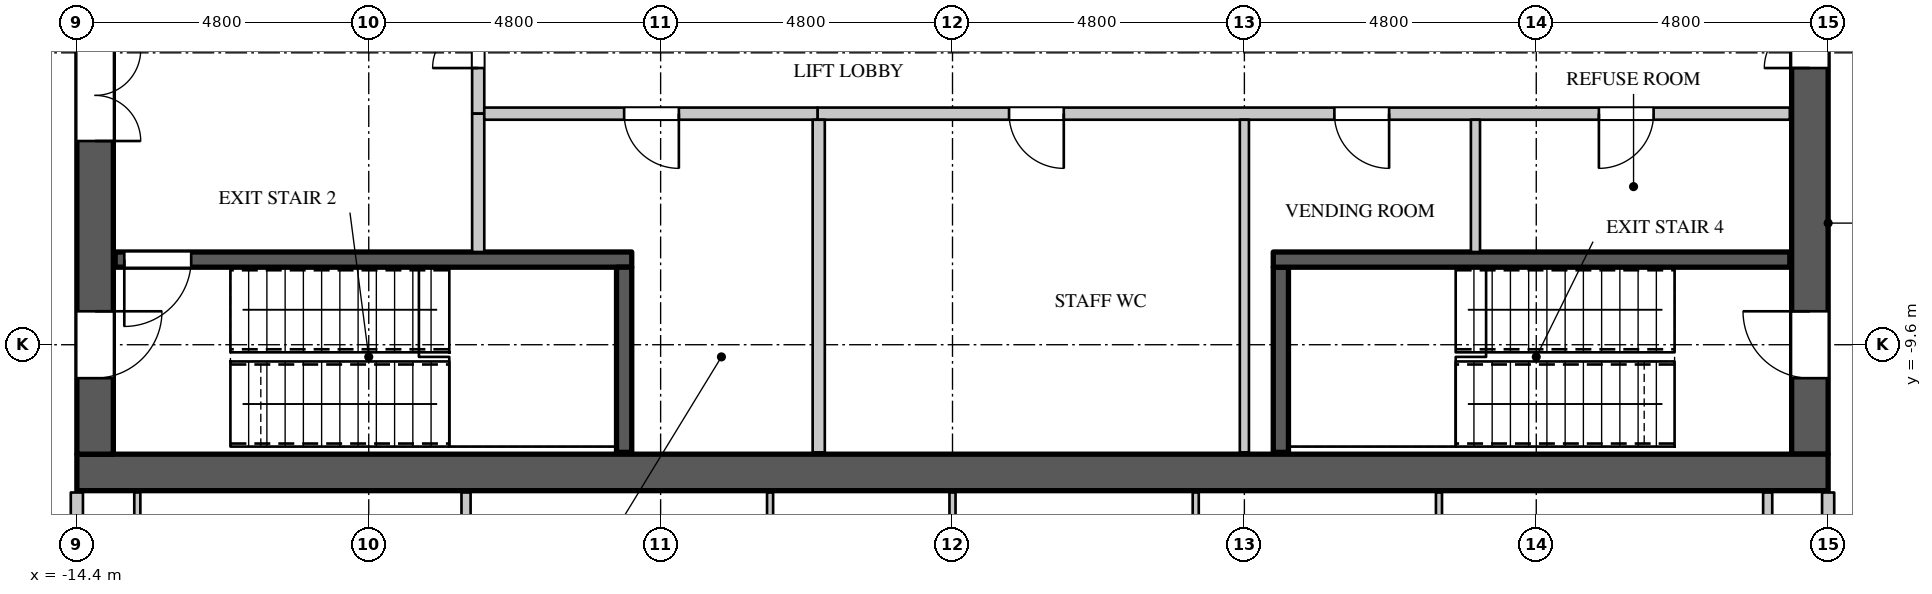
"""IFC4 building model, lengths in metres.
Left out: names, types, materials, properties, quantities, classifications, styles, units other than length and angle.
Written with IfcOpenShell. Run it as: python <this file> out.ifc"""

import sys

from ifc_helpers import new_model, si_unit, direction, frame, frame_2d, origin, place, context, subcontext, project, spatial, rectangle, extrude, element, fill, save


model = new_model("IFC4")
c1 = context("Model", 3, precision=1e-05, world=origin(), true_north=direction((0.0, 1.0)))
c2 = subcontext(c1, "Body", "Model", "MODEL_VIEW")
j1 = project(units=[si_unit("LENGTHUNIT", "METRE"), si_unit("PLANEANGLEUNIT", "RADIAN")], contexts=[c1])
p1 = place(None, origin())
s1 = spatial("IfcSite", under=j1, at=p1, CompositionType="ELEMENT")
p2 = place(p1, origin())
s2 = spatial("IfcBuilding", under=s1, at=p2, CompositionType="ELEMENT")
p3 = place(p2, frame((0.0, 0.0, 293.7)))
s3 = spatial("IfcBuildingStorey", under=s2, at=p3, CompositionType="ELEMENT", Elevation=293.7)
p4 = place(p3, frame((-14.4, -11.7, 0.0), z_axis=(0.0, 0.0, 1.0), x_axis=(1.0, 0.0, 0.0)))
e1 = element("IfcWall", 1, at=p4, inside=s3, PredefinedType="SHEAR", context=c2, shape_type="SweptSolid", body=[
    extrude(rectangle(XDim=28.8, YDim=0.6, at=frame_2d((14.4, 0.0))), origin(), (0.0, 0.0, 1.0), 4.2),
])
p5 = place(p3, frame((14.1, -11.4, 0.0), z_axis=(0.0, 0.0, 1.0), x_axis=(0.0, 1.0, 0.0)))
e2 = element("IfcWall", 2, at=p5, inside=s3, PredefinedType="SHEAR", context=c2, shape_type="SweptSolid", body=[
    extrude(rectangle(XDim=22.8, YDim=0.6, at=frame_2d((11.4, 0.0))), origin(), (0.0, 0.0, 1.0), 4.2),
])
p6 = place(p5, frame((20.45, 0.0, 0.0)))
e3 = element("IfcOpeningElement", 3, at=p6, cuts=e2, PredefinedType="OPENING", context=c2, shape_type="SweptSolid", body=[
    extrude(rectangle(XDim=1.1, YDim=2.2, at=frame_2d((0.55, 1.1))), frame((0.0, 0.31, 0.0), z_axis=(0.0, -1.0, 0.0), x_axis=(1.0, 0.0, 0.0)), (0.0, 0.0, 1.0), 0.62),
])
p7 = place(p5, frame((1.25, 0.0, 0.0)))
e4 = element("IfcOpeningElement", 4, at=p7, cuts=e2, PredefinedType="OPENING", context=c2, shape_type="SweptSolid", body=[
    extrude(rectangle(XDim=1.1, YDim=2.2, at=frame_2d((0.55, 1.1))), frame((0.0, 0.31, 0.0), z_axis=(0.0, -1.0, 0.0), x_axis=(1.0, 0.0, 0.0)), (0.0, 0.0, 1.0), 0.62),
])
p8 = place(p5, frame((14.95, 0.0, 0.0)))
e5 = element("IfcOpeningElement", 5, at=p8, cuts=e2, PredefinedType="OPENING", context=c2, shape_type="SweptSolid", body=[
    extrude(rectangle(XDim=1.5, YDim=2.4, at=frame_2d((0.75, 1.2))), frame((0.0, 0.31, 0.0), z_axis=(0.0, -1.0, 0.0), x_axis=(1.0, 0.0, 0.0)), (0.0, 0.0, 1.0), 0.62),
])
p9 = place(p5, frame((6.35, 0.0, 0.0)))
e6 = element("IfcOpeningElement", 6, at=p9, cuts=e2, PredefinedType="OPENING", context=c2, shape_type="SweptSolid", body=[
    extrude(rectangle(XDim=1.5, YDim=2.4, at=frame_2d((0.75, 1.2))), frame((0.0, 0.31, 0.0), z_axis=(0.0, -1.0, 0.0), x_axis=(1.0, 0.0, 0.0)), (0.0, 0.0, 1.0), 0.62),
])
p10 = place(p3, frame((-14.1, -11.4, 0.0), z_axis=(0.0, 0.0, 1.0), x_axis=(0.0, 1.0, 0.0)))
e7 = element("IfcWall", 7, at=p10, inside=s3, PredefinedType="SHEAR", context=c2, shape_type="SweptSolid", body=[
    extrude(rectangle(XDim=22.8, YDim=0.6, at=frame_2d((11.4, 0.0))), origin(), (0.0, 0.0, 1.0), 4.2),
])
p11 = place(p10, frame((20.45, 0.0, 0.0)))
e8 = element("IfcOpeningElement", 8, at=p11, cuts=e7, PredefinedType="OPENING", context=c2, shape_type="SweptSolid", body=[
    extrude(rectangle(XDim=1.1, YDim=2.2, at=frame_2d((0.55, 1.1))), frame((0.0, 0.31, 0.0), z_axis=(0.0, -1.0, 0.0), x_axis=(1.0, 0.0, 0.0)), (0.0, 0.0, 1.0), 0.62),
])
p12 = place(p10, frame((1.25, 0.0, 0.0)))
e9 = element("IfcOpeningElement", 9, at=p12, cuts=e7, PredefinedType="OPENING", context=c2, shape_type="SweptSolid", body=[
    extrude(rectangle(XDim=1.1, YDim=2.2, at=frame_2d((0.55, 1.1))), frame((0.0, 0.31, 0.0), z_axis=(0.0, -1.0, 0.0), x_axis=(1.0, 0.0, 0.0)), (0.0, 0.0, 1.0), 0.62),
])
p13 = place(p10, frame((16.15, 0.0, 0.0)))
e10 = element("IfcOpeningElement", 10, at=p13, cuts=e7, PredefinedType="OPENING", context=c2, shape_type="SweptSolid", body=[
    extrude(rectangle(XDim=1.5, YDim=2.4, at=frame_2d((0.75, 1.2))), frame((0.0, 0.31, 0.0), z_axis=(0.0, -1.0, 0.0), x_axis=(1.0, 0.0, 0.0)), (0.0, 0.0, 1.0), 0.62),
])
p14 = place(p10, frame((5.15, 0.0, 0.0)))
e11 = element("IfcOpeningElement", 11, at=p14, cuts=e7, PredefinedType="OPENING", context=c2, shape_type="SweptSolid", body=[
    extrude(rectangle(XDim=1.5, YDim=2.4, at=frame_2d((0.75, 1.2))), frame((0.0, 0.31, 0.0), z_axis=(0.0, -1.0, 0.0), x_axis=(1.0, 0.0, 0.0)), (0.0, 0.0, 1.0), 0.62),
])
p15 = place(p3, frame((-14.4, -14.3, 0.0), z_axis=(0.0, 0.0, 1.0), x_axis=(0.0, 1.0, 0.0)))
e12 = element("IfcWall", 12, at=p15, inside=s3, PredefinedType="PARTITIONING", context=c2, shape_type="SweptSolid", body=[
    extrude(rectangle(XDim=2.27, YDim=0.2, at=frame_2d((1.135, 0.0))), origin(), (0.0, 0.0, 1.0), 3.95),
])
p16 = place(p3, frame((-7.8, -5.8, 0.0), z_axis=(0.0, 0.0, 1.0), x_axis=(0.0, 1.0, 0.0)))
e13 = element("IfcWall", 13, at=p16, inside=s3, PredefinedType="PARTITIONING", context=c2, shape_type="SweptSolid", body=[
    extrude(rectangle(XDim=3.0, YDim=0.2, at=frame_2d((1.5, 0.0))), origin(), (0.0, 0.0, 1.0), 3.95),
])
p17 = place(p16, frame((0.75, 0.0, 0.0)))
e14 = element("IfcOpeningElement", 14, at=p17, cuts=e13, PredefinedType="OPENING", context=c2, shape_type="SweptSolid", body=[
    extrude(rectangle(XDim=1.5, YDim=2.4, at=frame_2d((0.75, 1.2))), frame((0.0, 0.11, 0.0), z_axis=(0.0, -1.0, 0.0), x_axis=(1.0, 0.0, 0.0)), (0.0, 0.0, 1.0), 0.22),
])
p18 = place(p3, frame((-2.22, -5.8, 0.0), z_axis=(0.0, 0.0, 1.0), x_axis=(1.0, 0.0, 0.0)))
e15 = element("IfcWall", 15, at=p18, inside=s3, PredefinedType="PARTITIONING", context=c2, shape_type="SweptSolid", body=[
    extrude(rectangle(XDim=15.99, YDim=0.2, at=frame_2d((7.995, 0.0))), origin(), (0.0, 0.0, 1.0), 3.95),
])
p19 = place(p18, frame((3.15, 0.0, 0.0)))
e16 = element("IfcOpeningElement", 16, at=p19, cuts=e15, PredefinedType="OPENING", context=c2, shape_type="SweptSolid", body=[
    extrude(rectangle(XDim=0.9, YDim=2.2, at=frame_2d((0.45, 1.1))), frame((0.0, 0.11, 0.0), z_axis=(0.0, -1.0, 0.0), x_axis=(1.0, 0.0, 0.0)), (0.0, 0.0, 1.0), 0.22),
])
p20 = place(p18, frame((8.5, 0.0, 0.0)))
e17 = element("IfcOpeningElement", 17, at=p20, cuts=e15, PredefinedType="OPENING", context=c2, shape_type="SweptSolid", body=[
    extrude(rectangle(XDim=0.9, YDim=2.2, at=frame_2d((0.45, 1.1))), frame((0.0, 0.11, 0.0), z_axis=(0.0, -1.0, 0.0), x_axis=(1.0, 0.0, 0.0)), (0.0, 0.0, 1.0), 0.22),
])
p21 = place(p18, frame((12.85, 0.0, 0.0)))
e18 = element("IfcOpeningElement", 18, at=p21, cuts=e15, PredefinedType="OPENING", context=c2, shape_type="SweptSolid", body=[
    extrude(rectangle(XDim=0.9, YDim=2.2, at=frame_2d((0.45, 1.1))), frame((0.0, 0.11, 0.0), z_axis=(0.0, -1.0, 0.0), x_axis=(1.0, 0.0, 0.0)), (0.0, 0.0, 1.0), 0.22),
])
p22 = place(p3, frame((14.4, -14.3, 0.0), z_axis=(0.0, 0.0, 1.0), x_axis=(0.0, 1.0, 0.0)))
e19 = element("IfcWall", 19, at=p22, inside=s3, PredefinedType="PARTITIONING", context=c2, shape_type="SweptSolid", body=[
    extrude(rectangle(XDim=2.27, YDim=0.2, at=frame_2d((1.135, 0.0))), origin(), (0.0, 0.0, 1.0), 3.95),
])
p23 = place(p3, frame((-8.0, -17.425, 0.0), z_axis=(0.0, 0.0, 1.0), x_axis=(0.0, 1.0, 0.0)))
e20 = element("IfcWall", 20, at=p23, inside=s3, PredefinedType="PARTITIONING", context=c2, shape_type="SweptSolid", body=[
    extrude(rectangle(XDim=5.395, YDim=0.15, at=frame_2d((2.698, 0.0))), origin(), (0.0, 0.0, 1.0), 3.95),
])
p24 = place(p23, frame((2.25, 0.0, 0.0)))
e21 = element("IfcOpeningElement", 21, at=p24, cuts=e20, PredefinedType="OPENING", context=c2, shape_type="SweptSolid", body=[
    extrude(rectangle(XDim=0.9, YDim=2.2, at=frame_2d((0.45, 1.1))), frame((0.0, 0.085, 0.0), z_axis=(0.0, -1.0, 0.0), x_axis=(1.0, 0.0, 0.0)), (0.0, 0.0, 1.0), 0.17),
])
p25 = place(p3, frame((4.8, -11.37, 0.0), z_axis=(0.0, 0.0, 1.0), x_axis=(0.0, 1.0, 0.0)))
e22 = element("IfcWall", 22, at=p25, inside=s3, PredefinedType="PARTITIONING", context=c2, shape_type="SweptSolid", body=[
    extrude(rectangle(XDim=5.47, YDim=0.15, at=frame_2d((2.735, 0.0))), origin(), (0.0, 0.0, 1.0), 3.95),
])
p26 = place(p3, frame((8.6, -8.075, 0.0), z_axis=(0.0, 0.0, 1.0), x_axis=(0.0, 1.0, 0.0)))
e23 = element("IfcWall", 23, at=p26, inside=s3, PredefinedType="PARTITIONING", context=c2, shape_type="SweptSolid", body=[
    extrude(rectangle(XDim=2.175, YDim=0.15, at=frame_2d((1.087, 0.0))), origin(), (0.0, 0.0, 1.0), 3.95),
])
p27 = place(p3, frame((13.406, -25.731, 0.0), z_axis=(0.0, 0.0, 1.0), x_axis=(0.0, 1.0, 0.0)))
e24 = element("IfcWall", 24, at=p27, inside=s3, PredefinedType="PARTITIONING", context=c2, shape_type="SweptSolid", body=[
    extrude(rectangle(XDim=13.701, YDim=0.15, at=frame_2d((6.851, 0.0))), origin(), (0.0, 0.0, 1.0), 3.3),
])
p28 = place(p27, frame((9.7, 0.0, 0.0)))
e25 = element("IfcOpeningElement", 25, at=p28, cuts=e24, PredefinedType="OPENING", context=c2, shape_type="SweptSolid", body=[
    extrude(rectangle(XDim=1.5, YDim=2.2, at=frame_2d((0.75, 1.1))), frame((0.0, 0.085, 0.0), z_axis=(0.0, -1.0, 0.0), x_axis=(1.0, 0.0, 0.0)), (0.0, 0.0, 1.0), 0.17),
])
p29 = place(p3, frame((-7.8, -8.075, 0.0), z_axis=(0.0, 0.0, 1.0), x_axis=(0.0, 1.0, 0.0)))
e26 = element("IfcWall", 26, at=p29, inside=s3, PredefinedType="PARTITIONING", context=c2, shape_type="SweptSolid", body=[
    extrude(rectangle(XDim=2.275, YDim=0.2, at=frame_2d((1.137, 0.0))), origin(), (0.0, 0.0, 1.0), 3.95),
])
p30 = place(p3, frame((-7.7, -5.8, 0.0), z_axis=(0.0, 0.0, 1.0), x_axis=(1.0, 0.0, 0.0)))
e27 = element("IfcWall", 27, at=p30, inside=s3, PredefinedType="PARTITIONING", context=c2, shape_type="SweptSolid", body=[
    extrude(rectangle(XDim=5.48, YDim=0.2, at=frame_2d((2.74, 0.0))), origin(), (0.0, 0.0, 1.0), 3.95),
])
p31 = place(p30, frame((2.3, 0.0, 0.0)))
e28 = element("IfcOpeningElement", 28, at=p31, cuts=e27, PredefinedType="OPENING", context=c2, shape_type="SweptSolid", body=[
    extrude(rectangle(XDim=0.9, YDim=2.2, at=frame_2d((0.45, 1.1))), frame((0.0, 0.11, 0.0), z_axis=(0.0, -1.0, 0.0), x_axis=(1.0, 0.0, 0.0)), (0.0, 0.0, 1.0), 0.22),
])
p32 = place(p3, frame((-2.2, -11.37, 0.0), z_axis=(0.0, 0.0, 1.0), x_axis=(0.0, 1.0, 0.0)))
e29 = element("IfcWall", 29, at=p32, inside=s3, PredefinedType="PARTITIONING", context=c2, shape_type="SweptSolid", body=[
    extrude(rectangle(XDim=5.47, YDim=0.2, at=frame_2d((2.735, 0.0))), origin(), (0.0, 0.0, 1.0), 3.95),
])
p33 = place(p3, frame((-13.77, -8.2, 0.0), z_axis=(0.0, 0.0, 1.0), x_axis=(1.0, 0.0, 0.0)))
e30 = element("IfcWall", 30, at=p33, inside=s3, PredefinedType="SHEAR", context=c2, shape_type="SweptSolid", body=[
    extrude(rectangle(XDim=8.495, YDim=0.25, at=frame_2d((4.248, 0.0))), origin(), (0.0, 0.0, 1.0), 3.95),
])
p34 = place(p33, frame((0.15, 0.0, 0.0)))
e31 = element("IfcOpeningElement", 31, at=p34, cuts=e30, PredefinedType="OPENING", context=c2, shape_type="SweptSolid", body=[
    extrude(rectangle(XDim=1.1, YDim=2.2, at=frame_2d((0.55, 1.1))), frame((0.0, 0.135, 0.0), z_axis=(0.0, -1.0, 0.0), x_axis=(1.0, 0.0, 0.0)), (0.0, 0.0, 1.0), 0.27),
])
for number, where, z_axis, x_axis in (
    (32, (-5.4, -11.37, 0.0), (0.0, 0.0, 1.0), (0.0, 1.0, 0.0)),
    (33, (5.4, -11.37, 0.0), (0.0, 0.0, 1.0), (0.0, 1.0, 0.0)),
):
    element("IfcWall", number, at=place(p3, frame(where, z_axis=z_axis, x_axis=x_axis)), inside=s3, PredefinedType="SHEAR", context=c2, shape_type="SweptSolid", body=[
        extrude(rectangle(XDim=3.045, YDim=0.25, at=frame_2d((1.522, 0.0))), origin(), (0.0, 0.0, 1.0), 3.95),
    ])
p35 = place(p3, frame((5.275, -8.2, 0.0), z_axis=(0.0, 0.0, 1.0), x_axis=(1.0, 0.0, 0.0)))
e34 = element("IfcWall", 34, at=p35, inside=s3, PredefinedType="SHEAR", context=c2, shape_type="SweptSolid", body=[
    extrude(rectangle(XDim=8.495, YDim=0.25, at=frame_2d((4.248, 0.0))), origin(), (0.0, 0.0, 1.0), 3.95),
])
p36 = place(p3, frame((-13.406, -16.6, 0.0), z_axis=(0.0, 0.0, 1.0), x_axis=(0.0, 1.0, 0.0)))
e35 = element("IfcWall", 35, at=p36, inside=s3, PredefinedType="PARTITIONING", context=c2, shape_type="SweptSolid", body=[
    extrude(rectangle(XDim=4.57, YDim=0.1, at=frame_2d((2.285, 0.0))), origin(), (0.0, 0.0, 1.0), 3.3),
])
p37 = place(p3, frame((-3.0, -17.45, 0.0), z_axis=(0.0, 0.0, 1.0), x_axis=(0.0, 1.0, 0.0)))
e36 = element("IfcWall", 36, at=p37, inside=s3, PredefinedType="PARTITIONING", context=c2, shape_type="SweptSolid", body=[
    extrude(rectangle(XDim=5.42, YDim=0.1, at=frame_2d((2.71, 0.0))), origin(), (0.0, 0.0, 1.0), 3.95),
])
p38 = place(p3, frame((0.0, -17.425, 0.0), z_axis=(0.0, 0.0, 1.0), x_axis=(0.0, 1.0, 0.0)))
e37 = element("IfcWall", 37, at=p38, inside=s3, PredefinedType="PARTITIONING", context=c2, shape_type="SweptSolid", body=[
    extrude(rectangle(XDim=5.395, YDim=0.1, at=frame_2d((2.698, 0.0))), origin(), (0.0, 0.0, 1.0), 3.95),
])
p39 = place(p3, frame((4.0, -17.45, 0.0), z_axis=(0.0, 0.0, 1.0), x_axis=(0.0, 1.0, 0.0)))
e38 = element("IfcWall", 38, at=p39, inside=s3, PredefinedType="PARTITIONING", context=c2, shape_type="SweptSolid", body=[
    extrude(rectangle(XDim=5.42, YDim=0.1, at=frame_2d((2.71, 0.0))), origin(), (0.0, 0.0, 1.0), 3.95),
])
p40 = place(p3, frame((8.0, -16.475, 0.0), z_axis=(0.0, 0.0, 1.0), x_axis=(0.0, 1.0, 0.0)))
e39 = element("IfcWall", 39, at=p40, inside=s3, PredefinedType="PARTITIONING", context=c2, shape_type="SweptSolid", body=[
    extrude(rectangle(XDim=4.445, YDim=0.1, at=frame_2d((2.223, 0.0))), origin(), (0.0, 0.0, 1.0), 3.95),
])
p41 = place(p40, frame((1.75, 0.0, 0.0)))
e40 = element("IfcOpeningElement", 40, at=p41, cuts=e39, PredefinedType="OPENING", context=c2, shape_type="SweptSolid", body=[
    extrude(rectangle(XDim=0.9, YDim=2.2, at=frame_2d((0.45, 1.1))), frame((0.0, 0.06, 0.0), z_axis=(0.0, -1.0, 0.0), x_axis=(1.0, 0.0, 0.0)), (0.0, 0.0, 1.0), 0.12),
])
p42 = place(p31, origin())
e41 = element("IfcDoor", 41, at=p42, inside=s3, OperationType="SINGLE_SWING_LEFT", PredefinedType="DOOR", context=c2, shape_type="SweptSolid", body=[
    extrude(rectangle(XDim=0.9, YDim=2.2, at=frame_2d((0.45, 1.1))), frame((0.0, 0.025, 0.0), z_axis=(0.0, -1.0, 0.0), x_axis=(1.0, 0.0, 0.0)), (0.0, 0.0, 1.0), 0.05),
])
fill(e28, e41)
p43 = place(p19, origin())
e42 = element("IfcDoor", 42, at=p43, inside=s3, OperationType="SINGLE_SWING_LEFT", PredefinedType="DOOR", context=c2, shape_type="SweptSolid", body=[
    extrude(rectangle(XDim=0.9, YDim=2.2, at=frame_2d((0.45, 1.1))), frame((0.0, 0.025, 0.0), z_axis=(0.0, -1.0, 0.0), x_axis=(1.0, 0.0, 0.0)), (0.0, 0.0, 1.0), 0.05),
])
fill(e16, e42)
p44 = place(p20, origin())
e43 = element("IfcDoor", 43, at=p44, inside=s3, OperationType="SINGLE_SWING_LEFT", PredefinedType="DOOR", context=c2, shape_type="SweptSolid", body=[
    extrude(rectangle(XDim=0.9, YDim=2.2, at=frame_2d((0.45, 1.1))), frame((0.0, 0.025, 0.0), z_axis=(0.0, -1.0, 0.0), x_axis=(1.0, 0.0, 0.0)), (0.0, 0.0, 1.0), 0.05),
])
fill(e17, e43)
p45 = place(p21, origin())
e44 = element("IfcDoor", 44, at=p45, inside=s3, OperationType="SINGLE_SWING_RIGHT", PredefinedType="DOOR", context=c2, shape_type="SweptSolid", body=[
    extrude(rectangle(XDim=0.9, YDim=2.2, at=frame_2d((0.45, 1.1))), frame((0.0, 0.025, 0.0), z_axis=(0.0, -1.0, 0.0), x_axis=(1.0, 0.0, 0.0)), (0.0, 0.0, 1.0), 0.05),
])
fill(e18, e44)
p46 = place(p34, origin())
e45 = element("IfcDoor", 45, at=p46, inside=s3, OperationType="SINGLE_SWING_RIGHT", PredefinedType="DOOR", context=c2, shape_type="SweptSolid", body=[
    extrude(rectangle(XDim=1.1, YDim=2.2, at=frame_2d((0.55, 1.1))), frame((0.0, 0.025, 0.0), z_axis=(0.0, -1.0, 0.0), x_axis=(1.0, 0.0, 0.0)), (0.0, 0.0, 1.0), 0.05),
])
fill(e31, e45)
p47 = place(p17, origin())
e46 = element("IfcDoor", 46, at=p47, inside=s3, OperationType="DOUBLE_DOOR_SINGLE_SWING", PredefinedType="DOOR", context=c2, shape_type="SweptSolid", body=[
    extrude(rectangle(XDim=1.5, YDim=2.4, at=frame_2d((0.75, 1.2))), frame((0.0, 0.025, 0.0), z_axis=(0.0, -1.0, 0.0), x_axis=(1.0, 0.0, 0.0)), (0.0, 0.0, 1.0), 0.05),
])
fill(e14, e46)
p48 = place(p12, origin())
e47 = element("IfcDoor", 47, at=p48, inside=s3, OperationType="SINGLE_SWING_LEFT", PredefinedType="DOOR", context=c2, shape_type="SweptSolid", body=[
    extrude(rectangle(XDim=1.1, YDim=2.2, at=frame_2d((0.55, 1.1))), frame((0.0, -0.245, 0.0), z_axis=(0.0, -1.0, 0.0), x_axis=(1.0, 0.0, 0.0)), (0.0, 0.0, 1.0), 0.05),
])
fill(e9, e47)
p49 = place(p7, origin())
e48 = element("IfcDoor", 48, at=p49, inside=s3, OperationType="SINGLE_SWING_RIGHT", PredefinedType="DOOR", context=c2, shape_type="SweptSolid", body=[
    extrude(rectangle(XDim=1.1, YDim=2.2, at=frame_2d((0.55, 1.1))), frame((0.0, 0.295, 0.0), z_axis=(0.0, -1.0, 0.0), x_axis=(1.0, 0.0, 0.0)), (0.0, 0.0, 1.0), 0.05),
])
fill(e4, e48)
p50 = place(p14, origin())
e49 = element("IfcDoor", 49, at=p50, inside=s3, OperationType="DOUBLE_DOOR_SINGLE_SWING", PredefinedType="DOOR", context=c2, shape_type="SweptSolid", body=[
    extrude(rectangle(XDim=1.5, YDim=2.4, at=frame_2d((0.75, 1.2))), frame((0.0, -0.245, 0.0), z_axis=(0.0, -1.0, 0.0), x_axis=(1.0, 0.0, 0.0)), (0.0, 0.0, 1.0), 0.05),
])
fill(e11, e49)
p51 = place(p9, origin())
e50 = element("IfcDoor", 50, at=p51, inside=s3, OperationType="DOUBLE_DOOR_SINGLE_SWING", PredefinedType="DOOR", context=c2, shape_type="SweptSolid", body=[
    extrude(rectangle(XDim=1.5, YDim=2.4, at=frame_2d((0.75, 1.2))), frame((0.0, 0.295, 0.0), z_axis=(0.0, -1.0, 0.0), x_axis=(1.0, 0.0, 0.0)), (0.0, 0.0, 1.0), 0.05),
])
fill(e6, e50)
save(model, sys.argv[1])
